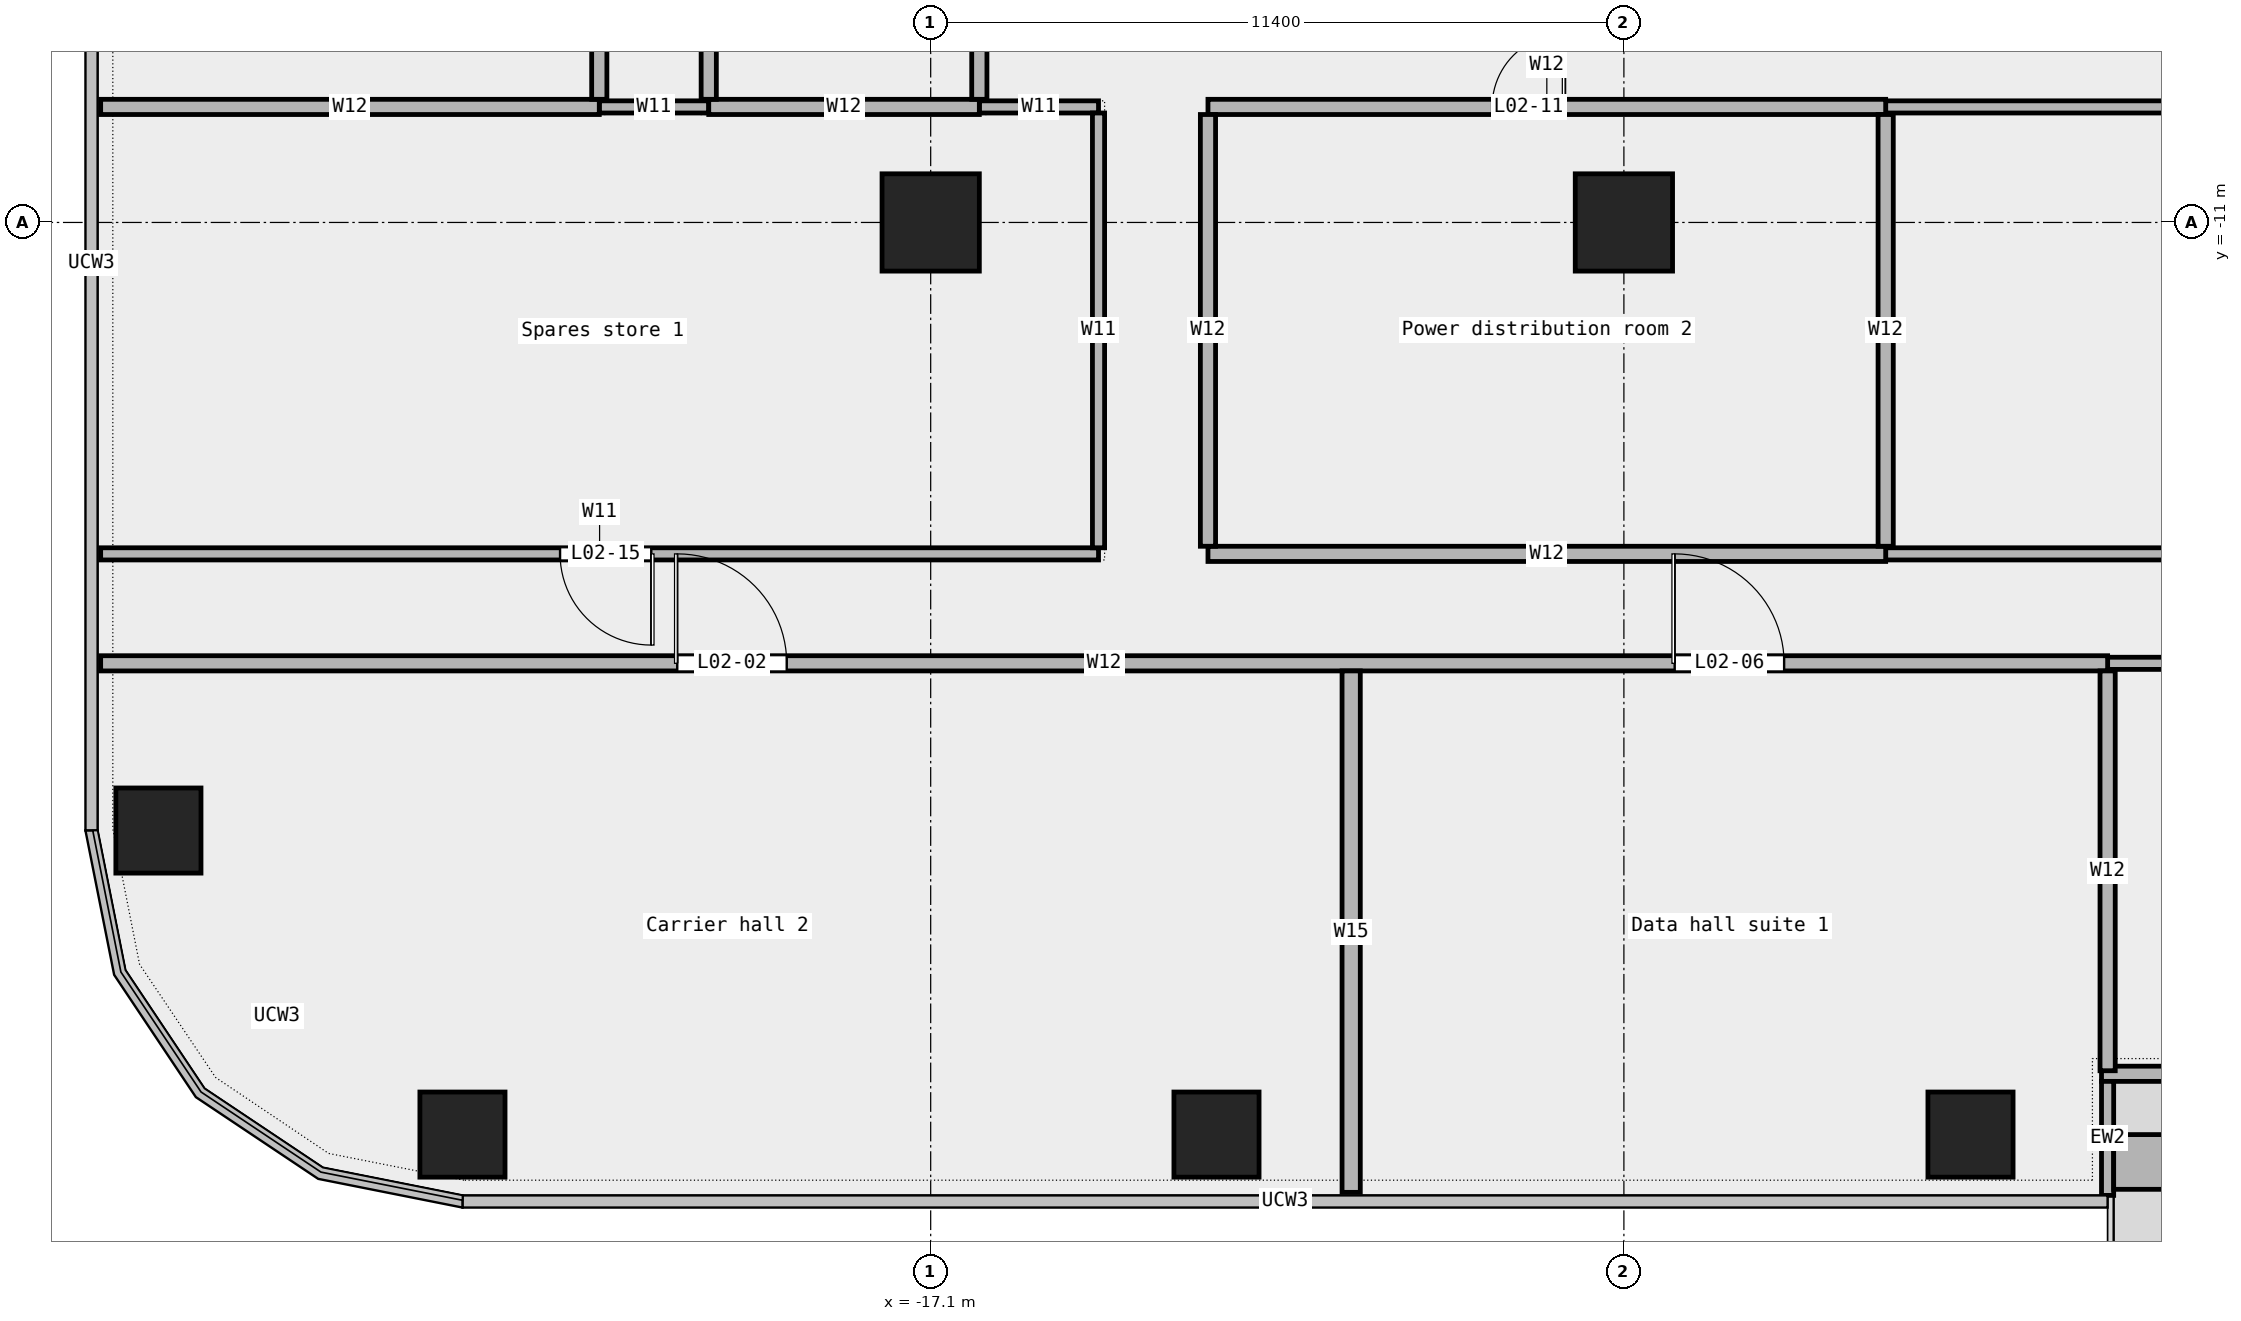
"""IFC4 building model, lengths in metres.
Left out: names, types, materials, properties, quantities, classifications, styles, units other than length and angle.
Written with IfcOpenShell. Run it as: python <this file> out.ifc"""

import sys

from ifc_helpers import new_model, si_unit, direction, frame, frame_2d, origin, origin_2d, place, context, subcontext, project, spatial, rectangle, extrude, element, fill, save


model = new_model("IFC4")
c1 = context("Model", 3, precision=1e-05, world=origin(), true_north=direction((0.0, 1.0)))
c2 = subcontext(c1, "Body", "Model", "MODEL_VIEW")
j1 = project(units=[si_unit("LENGTHUNIT", "METRE"), si_unit("PLANEANGLEUNIT", "RADIAN")], contexts=[c1])
p1 = place(None, origin())
s1 = spatial("IfcSite", under=j1, at=p1, CompositionType="ELEMENT")
p2 = place(p1, origin())
s2 = spatial("IfcBuilding", under=s1, at=p2, CompositionType="ELEMENT")
p3 = place(p2, frame((0.0, 0.0, 14.5)))
s3 = spatial("IfcBuildingStorey", under=s2, at=p3, CompositionType="ELEMENT", Elevation=14.5)
for number, where, z_axis, x_axis in (
    (1, (-24.8, -26.0, 0.0), (0.0, 0.0, 1.0), (1.0, 0.0, 0.0)),
    (2, (-12.4, -26.0, 0.0), (0.0, 0.0, 1.0), (1.0, 0.0, 0.0)),
    (3, (0.0, -26.0, 0.0), (0.0, 0.0, 1.0), (1.0, 0.0, 0.0)),
    (4, (-29.8, -21.0, 0.0), (0.0, 0.0, 1.0), (1.0, 0.0, 0.0)),
):
    element("IfcColumn", number, at=place(p3, frame(where, z_axis=z_axis, x_axis=x_axis)), inside=s3, PredefinedType="COLUMN", context=c2, shape_type="SweptSolid", body=[
        extrude(rectangle(XDim=1.4, YDim=1.4, at=origin_2d()), origin(), (0.0, 0.0, 1.0), 5.0),
    ])
for number, where, z_axis, x_axis in (
    (5, (-17.1, -11.0, 0.0), (0.0, 0.0, 1.0), (1.0, 0.0, 0.0)),
    (6, (-5.7, -11.0, 0.0), (0.0, 0.0, 1.0), (1.0, 0.0, 0.0)),
):
    element("IfcColumn", number, at=place(p3, frame(where, z_axis=z_axis, x_axis=x_axis)), inside=s3, PredefinedType="COLUMN", context=c2, shape_type="SweptSolid", body=[
        extrude(rectangle(XDim=1.6, YDim=1.6, at=origin_2d()), origin(), (0.0, 0.0, 1.0), 5.0),
    ])
p4 = place(p3, frame((2.155, -25.0, 0.0), z_axis=(0.0, 0.0, 1.0), x_axis=(1.0, 0.0, 0.0)))
e7 = element("IfcWall", 7, at=p4, inside=s3, PredefinedType="STANDARD", context=c2, shape_type="SweptSolid", body=[
    extrude(rectangle(XDim=13.727, YDim=0.25, at=frame_2d((6.864, 0.0))), origin(), (0.0, 0.0, 1.0), 5.0),
])
p5 = place(p4, frame((1.75, 0.0, 0.45)))
e8 = element("IfcOpeningElement", 8, at=p5, cuts=e7, PredefinedType="OPENING", context=c2, shape_type="SweptSolid", body=[
    extrude(rectangle(XDim=1.5, YDim=3.0, at=frame_2d((0.75, 1.5))), frame((0.0, 0.137, 0.0), z_axis=(0.0, -1.0, 0.0), x_axis=(1.0, 0.0, 0.0)), (0.0, 0.0, 1.0), 0.274),
])
p6 = place(p4, frame((6.0, 0.0, 0.0)))
e9 = element("IfcOpeningElement", 9, at=p6, cuts=e7, PredefinedType="OPENING", context=c2, shape_type="SweptSolid", body=[
    extrude(rectangle(XDim=1.8, YDim=2.4, at=frame_2d((0.9, 1.2))), frame((0.0, 0.137, 0.0), z_axis=(0.0, -1.0, 0.0), x_axis=(1.0, 0.0, 0.0)), (0.0, 0.0, 1.0), 0.274),
])
p7 = place(p4, frame((11.25, 0.0, 0.45)))
e10 = element("IfcOpeningElement", 10, at=p7, cuts=e7, PredefinedType="OPENING", context=c2, shape_type="SweptSolid", body=[
    extrude(rectangle(XDim=1.5, YDim=3.0, at=frame_2d((0.75, 1.5))), frame((0.0, 0.137, 0.0), z_axis=(0.0, -1.0, 0.0), x_axis=(1.0, 0.0, 0.0)), (0.0, 0.0, 1.0), 0.274),
])
p8 = place(p3, frame((2.255, -27.0, 0.0), z_axis=(0.0, 0.0, 1.0), x_axis=(0.0, 1.0, 0.0)))
e11 = element("IfcWall", 11, at=p8, inside=s3, PredefinedType="STANDARD", context=c2, shape_type="SweptSolid", body=[
    extrude(rectangle(XDim=1.875, YDim=0.2, at=frame_2d((0.938, 0.0))), origin(), (0.0, 0.0, 1.0), 5.0),
])
p9 = place(p3, frame((2.354, -26.45, 0.0), z_axis=(0.0, 0.0, 1.0), x_axis=(1.0, 0.0, 0.0)))
e12 = element("IfcWall", 12, at=p9, inside=s3, PredefinedType="STANDARD", context=c2, shape_type="SweptSolid", body=[
    extrude(rectangle(XDim=3.6, YDim=0.9, at=frame_2d((1.8, 0.0))), origin(), (0.0, 0.0, 1.0), 0.7),
])
p10 = place(p3, frame((2.255, -18.25, 0.0), z_axis=(0.0, 0.0, 1.0), x_axis=(1.0, 0.0, 0.0)))
e13 = element("IfcWall", 13, at=p10, inside=s3, PredefinedType="PARTITIONING", context=c2, shape_type="SweptSolid", body=[
    extrude(rectangle(XDim=13.525, YDim=0.2, at=frame_2d((6.763, 0.0))), origin(), (0.0, 0.0, 1.0), 5.0),
])
p11 = place(p10, frame((6.163, 0.0, 0.0)))
e14 = element("IfcOpeningElement", 14, at=p11, cuts=e13, PredefinedType="OPENING", context=c2, shape_type="SweptSolid", body=[
    extrude(rectangle(XDim=1.2, YDim=2.1, at=frame_2d((0.6, 1.05))), frame((0.0, 0.112, 0.0), z_axis=(0.0, -1.0, 0.0), x_axis=(1.0, 0.0, 0.0)), (0.0, 0.0, 1.0), 0.224),
])
p12 = place(p3, frame((-30.75, -18.25, 0.0), z_axis=(0.0, 0.0, 1.0), x_axis=(1.0, 0.0, 0.0)))
e15 = element("IfcWall", 15, at=p12, inside=s3, PredefinedType="PARTITIONING", context=c2, shape_type="SweptSolid", body=[
    extrude(rectangle(XDim=33.005, YDim=0.25, at=frame_2d((16.502, 0.0))), origin(), (0.0, 0.0, 1.0), 5.0),
])
p13 = place(p12, frame((9.482, 0.0, 0.0)))
e16 = element("IfcOpeningElement", 16, at=p13, cuts=e15, PredefinedType="OPENING", context=c2, shape_type="SweptSolid", body=[
    extrude(rectangle(XDim=1.8, YDim=2.1, at=frame_2d((0.9, 1.05))), frame((0.0, 0.137, 0.0), z_axis=(0.0, -1.0, 0.0), x_axis=(1.0, 0.0, 0.0)), (0.0, 0.0, 1.0), 0.274),
])
p14 = place(p12, frame((25.885, 0.0, 0.0)))
e17 = element("IfcOpeningElement", 17, at=p14, cuts=e15, PredefinedType="OPENING", context=c2, shape_type="SweptSolid", body=[
    extrude(rectangle(XDim=1.8, YDim=2.1, at=frame_2d((0.9, 1.05))), frame((0.0, 0.137, 0.0), z_axis=(0.0, -1.0, 0.0), x_axis=(1.0, 0.0, 0.0)), (0.0, 0.0, 1.0), 0.274),
])
p15 = place(p3, frame((-30.75, -16.45, 0.0), z_axis=(0.0, 0.0, 1.0), x_axis=(1.0, 0.0, 0.0)))
e18 = element("IfcWall", 18, at=p15, inside=s3, PredefinedType="PARTITIONING", context=c2, shape_type="SweptSolid", body=[
    extrude(rectangle(XDim=16.41, YDim=0.2, at=frame_2d((8.205, 0.0))), origin(), (0.0, 0.0, 1.0), 5.0),
])
p16 = place(p15, frame((7.555, 0.0, 0.0)))
e19 = element("IfcOpeningElement", 19, at=p16, cuts=e18, PredefinedType="OPENING", context=c2, shape_type="SweptSolid", body=[
    extrude(rectangle(XDim=1.5, YDim=2.1, at=frame_2d((0.75, 1.05))), frame((0.0, 0.112, 0.0), z_axis=(0.0, -1.0, 0.0), x_axis=(1.0, 0.0, 0.0)), (0.0, 0.0, 1.0), 0.224),
])
p17 = place(p3, frame((-1.395, -16.45, 0.0), z_axis=(0.0, 0.0, 1.0), x_axis=(1.0, 0.0, 0.0)))
e20 = element("IfcWall", 20, at=p17, inside=s3, PredefinedType="PARTITIONING", context=c2, shape_type="SweptSolid", body=[
    extrude(rectangle(XDim=13.935, YDim=0.2, at=frame_2d((6.968, 0.0))), origin(), (0.0, 0.0, 1.0), 5.0),
])
p18 = place(p3, frame((-12.54, -16.45, 0.0), z_axis=(0.0, 0.0, 1.0), x_axis=(1.0, 0.0, 0.0)))
e21 = element("IfcWall", 21, at=p18, inside=s3, PredefinedType="PARTITIONING", context=c2, shape_type="SweptSolid", body=[
    extrude(rectangle(XDim=11.145, YDim=0.25, at=frame_2d((5.573, 0.0))), origin(), (0.0, 0.0, 1.0), 5.0),
])
p19 = place(p3, frame((-22.55, -9.1, 0.0), z_axis=(0.0, 0.0, 1.0), x_axis=(1.0, 0.0, 0.0)))
e22 = element("IfcWall", 22, at=p19, inside=s3, PredefinedType="PARTITIONING", context=c2, shape_type="SweptSolid", body=[
    extrude(rectangle(XDim=1.8, YDim=0.2, at=frame_2d((0.9, 0.0))), origin(), (0.0, 0.0, 1.0), 5.0),
])
p20 = place(p3, frame((-16.3, -9.1, 0.0), z_axis=(0.0, 0.0, 1.0), x_axis=(1.0, 0.0, 0.0)))
e23 = element("IfcWall", 23, at=p20, inside=s3, PredefinedType="PARTITIONING", context=c2, shape_type="SweptSolid", body=[
    extrude(rectangle(XDim=1.96, YDim=0.2, at=frame_2d((0.98, 0.0))), origin(), (0.0, 0.0, 1.0), 5.0),
])
p21 = place(p3, frame((-1.395, -9.1, 0.0), z_axis=(0.0, 0.0, 1.0), x_axis=(1.0, 0.0, 0.0)))
e24 = element("IfcWall", 24, at=p21, inside=s3, PredefinedType="PARTITIONING", context=c2, shape_type="SweptSolid", body=[
    extrude(rectangle(XDim=13.935, YDim=0.2, at=frame_2d((6.968, 0.0))), origin(), (0.0, 0.0, 1.0), 5.0),
])
p22 = place(p21, frame((4.718, 0.0, 0.0)))
e25 = element("IfcOpeningElement", 25, at=p22, cuts=e24, PredefinedType="OPENING", context=c2, shape_type="SweptSolid", body=[
    extrude(rectangle(XDim=1.5, YDim=2.1, at=frame_2d((0.75, 1.05))), frame((0.0, 0.112, 0.0), z_axis=(0.0, -1.0, 0.0), x_axis=(1.0, 0.0, 0.0)), (0.0, 0.0, 1.0), 0.224),
])
p23 = place(p3, frame((-30.75, -9.1, 0.0), z_axis=(0.0, 0.0, 1.0), x_axis=(1.0, 0.0, 0.0)))
e26 = element("IfcWall", 26, at=p23, inside=s3, PredefinedType="PARTITIONING", context=c2, shape_type="SweptSolid", body=[
    extrude(rectangle(XDim=8.2, YDim=0.25, at=frame_2d((4.1, 0.0))), origin(), (0.0, 0.0, 1.0), 5.0),
])
p24 = place(p3, frame((-20.75, -9.1, 0.0), z_axis=(0.0, 0.0, 1.0), x_axis=(1.0, 0.0, 0.0)))
e27 = element("IfcWall", 27, at=p24, inside=s3, PredefinedType="PARTITIONING", context=c2, shape_type="SweptSolid", body=[
    extrude(rectangle(XDim=4.45, YDim=0.25, at=frame_2d((2.225, 0.0))), origin(), (0.0, 0.0, 1.0), 5.0),
])
p25 = place(p3, frame((-12.54, -9.1, 0.0), z_axis=(0.0, 0.0, 1.0), x_axis=(1.0, 0.0, 0.0)))
e28 = element("IfcWall", 28, at=p25, inside=s3, PredefinedType="PARTITIONING", context=c2, shape_type="SweptSolid", body=[
    extrude(rectangle(XDim=11.145, YDim=0.25, at=frame_2d((5.573, 0.0))), origin(), (0.0, 0.0, 1.0), 5.0),
])
p26 = place(p25, frame((4.673, 0.0, 0.0)))
e29 = element("IfcOpeningElement", 29, at=p26, cuts=e28, PredefinedType="OPENING", context=c2, shape_type="SweptSolid", body=[
    extrude(rectangle(XDim=1.2, YDim=2.1, at=frame_2d((0.6, 1.05))), frame((0.0, 0.137, 0.0), z_axis=(0.0, -1.0, 0.0), x_axis=(1.0, 0.0, 0.0)), (0.0, 0.0, 1.0), 0.274),
])
p27 = place(p3, frame((-22.55, -8.975, 0.0), z_axis=(0.0, 0.0, 1.0), x_axis=(0.0, 1.0, 0.0)))
e30 = element("IfcWall", 30, at=p27, inside=s3, PredefinedType="PARTITIONING", context=c2, shape_type="SweptSolid", body=[
    extrude(rectangle(XDim=6.515, YDim=0.25, at=frame_2d((3.258, 0.0))), origin(), (0.0, 0.0, 1.0), 5.0),
])
p28 = place(p27, frame((2.657, 0.0, 0.0)))
e31 = element("IfcOpeningElement", 31, at=p28, cuts=e30, PredefinedType="OPENING", context=c2, shape_type="SweptSolid", body=[
    extrude(rectangle(XDim=1.2, YDim=2.1, at=frame_2d((0.6, 1.05))), frame((0.0, 0.137, 0.0), z_axis=(0.0, -1.0, 0.0), x_axis=(1.0, 0.0, 0.0)), (0.0, 0.0, 1.0), 0.274),
])
p29 = place(p3, frame((-20.75, -8.975, 0.0), z_axis=(0.0, 0.0, 1.0), x_axis=(0.0, 1.0, 0.0)))
e32 = element("IfcWall", 32, at=p29, inside=s3, PredefinedType="PARTITIONING", context=c2, shape_type="SweptSolid", body=[
    extrude(rectangle(XDim=11.1, YDim=0.25, at=frame_2d((5.55, 0.0))), origin(), (0.0, 0.0, 1.0), 5.0),
])
p30 = place(p3, frame((-16.3, -8.975, 0.0), z_axis=(0.0, 0.0, 1.0), x_axis=(0.0, 1.0, 0.0)))
e33 = element("IfcWall", 33, at=p30, inside=s3, PredefinedType="PARTITIONING", context=c2, shape_type="SweptSolid", body=[
    extrude(rectangle(XDim=8.175, YDim=0.25, at=frame_2d((4.087, 0.0))), origin(), (0.0, 0.0, 1.0), 5.0),
])
p31 = place(p30, frame((3.488, 0.0, 0.0)))
e34 = element("IfcOpeningElement", 34, at=p31, cuts=e33, PredefinedType="OPENING", context=c2, shape_type="SweptSolid", body=[
    extrude(rectangle(XDim=1.2, YDim=2.1, at=frame_2d((0.6, 1.05))), frame((0.0, 0.137, 0.0), z_axis=(0.0, -1.0, 0.0), x_axis=(1.0, 0.0, 0.0)), (0.0, 0.0, 1.0), 0.274),
])
p32 = place(p3, frame((-14.34, -16.35, 0.0), z_axis=(0.0, 0.0, 1.0), x_axis=(0.0, 1.0, 0.0)))
e35 = element("IfcWall", 35, at=p32, inside=s3, PredefinedType="PARTITIONING", context=c2, shape_type="SweptSolid", body=[
    extrude(rectangle(XDim=7.15, YDim=0.2, at=frame_2d((3.575, 0.0))), origin(), (0.0, 0.0, 1.0), 5.0),
])
p33 = place(p3, frame((-12.54, -16.325, 0.0), z_axis=(0.0, 0.0, 1.0), x_axis=(0.0, 1.0, 0.0)))
e36 = element("IfcWall", 36, at=p33, inside=s3, PredefinedType="PARTITIONING", context=c2, shape_type="SweptSolid", body=[
    extrude(rectangle(XDim=7.1, YDim=0.25, at=frame_2d((3.55, 0.0))), origin(), (0.0, 0.0, 1.0), 5.0),
])
p34 = place(p3, frame((-10.185, -26.95, 0.0), z_axis=(0.0, 0.0, 1.0), x_axis=(0.0, 1.0, 0.0)))
e37 = element("IfcWall", 37, at=p34, inside=s3, PredefinedType="PARTITIONING", context=c2, shape_type="SweptSolid", body=[
    extrude(rectangle(XDim=8.575, YDim=0.3, at=frame_2d((4.288, 0.0))), origin(), (0.0, 0.0, 1.0), 5.0),
])
p35 = place(p3, frame((-1.395, -16.325, 0.0), z_axis=(0.0, 0.0, 1.0), x_axis=(0.0, 1.0, 0.0)))
e38 = element("IfcWall", 38, at=p35, inside=s3, PredefinedType="PARTITIONING", context=c2, shape_type="SweptSolid", body=[
    extrude(rectangle(XDim=7.1, YDim=0.25, at=frame_2d((3.55, 0.0))), origin(), (0.0, 0.0, 1.0), 5.0),
])
p36 = place(p3, frame((2.255, -24.95, 0.0), z_axis=(0.0, 0.0, 1.0), x_axis=(0.0, 1.0, 0.0)))
e39 = element("IfcWall", 39, at=p36, inside=s3, PredefinedType="PARTITIONING", context=c2, shape_type="SweptSolid", body=[
    extrude(rectangle(XDim=6.575, YDim=0.25, at=frame_2d((3.288, 0.0))), origin(), (0.0, 0.0, 1.0), 5.0),
])
p37 = place(p13, origin())
e40 = element("IfcDoor", 40, at=p37, inside=s3, OperationType="DOUBLE_DOOR_SINGLE_SWING", PredefinedType="DOOR", context=c2, shape_type="SweptSolid", body=[
    extrude(rectangle(XDim=1.8, YDim=2.1, at=frame_2d((0.9, 1.05))), frame((0.0, 0.025, 0.0), z_axis=(0.0, -1.0, 0.0), x_axis=(1.0, 0.0, 0.0)), (0.0, 0.0, 1.0), 0.05),
])
fill(e16, e40)
p38 = place(p14, origin())
e41 = element("IfcDoor", 41, at=p38, inside=s3, OperationType="DOUBLE_DOOR_SINGLE_SWING", PredefinedType="DOOR", context=c2, shape_type="SweptSolid", body=[
    extrude(rectangle(XDim=1.8, YDim=2.1, at=frame_2d((0.9, 1.05))), frame((0.0, 0.025, 0.0), z_axis=(0.0, -1.0, 0.0), x_axis=(1.0, 0.0, 0.0)), (0.0, 0.0, 1.0), 0.05),
])
fill(e17, e41)
p39 = place(p26, origin())
e42 = element("IfcDoor", 42, at=p39, inside=s3, OperationType="SINGLE_SWING_RIGHT", PredefinedType="DOOR", context=c2, shape_type="SweptSolid", body=[
    extrude(rectangle(XDim=1.2, YDim=2.1, at=frame_2d((0.6, 1.05))), frame((0.0, 0.025, 0.0), z_axis=(0.0, -1.0, 0.0), x_axis=(1.0, 0.0, 0.0)), (0.0, 0.0, 1.0), 0.05),
])
fill(e29, e42)
p40 = place(p16, origin())
e43 = element("IfcDoor", 43, at=p40, inside=s3, OperationType="DOUBLE_DOOR_SINGLE_SWING", PredefinedType="DOOR", context=c2, shape_type="SweptSolid", body=[
    extrude(rectangle(XDim=1.5, YDim=2.1, at=frame_2d((0.75, 1.05))), frame((0.0, 0.025, 0.0), z_axis=(0.0, -1.0, 0.0), x_axis=(1.0, 0.0, 0.0)), (0.0, 0.0, 1.0), 0.05),
])
fill(e19, e43)
save(model, sys.argv[1])
